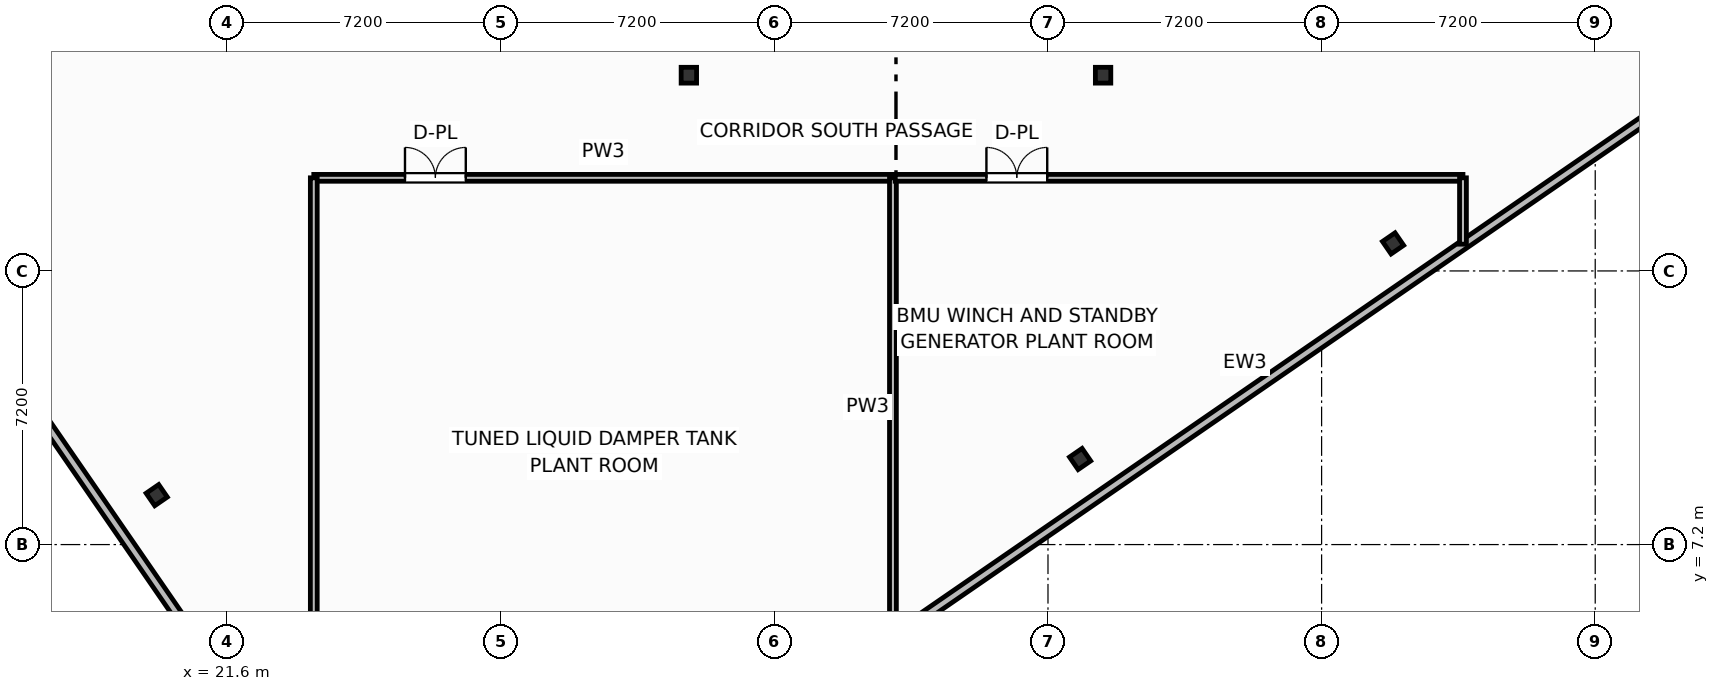
"""IFC4 building model, lengths in metres.
Left out: names, types, materials, properties, quantities, classifications, styles, units other than length and angle.
Written with IfcOpenShell. Run it as: python <this file> out.ifc"""

import sys

from ifc_helpers import new_model, si_unit, direction, frame, frame_2d, origin, origin_2d, place, context, subcontext, project, spatial, rectangle, i_section, extrude, element, fill, save


model = new_model("IFC4")
c1 = context("Model", 3, precision=1e-05, world=origin(), true_north=direction((0.0, 1.0)))
c2 = subcontext(c1, "Body", "Model", "MODEL_VIEW")
j1 = project(units=[si_unit("LENGTHUNIT", "METRE"), si_unit("PLANEANGLEUNIT", "RADIAN")], contexts=[c1])
p1 = place(None, origin())
s1 = spatial("IfcSite", under=j1, at=p1, CompositionType="ELEMENT")
p2 = place(p1, origin())
s2 = spatial("IfcBuilding", under=s1, at=p2, CompositionType="ELEMENT")
p3 = place(p2, frame((0.0, 0.0, 305.9)))
s3 = spatial("IfcBuildingStorey", under=s2, at=p3, CompositionType="ELEMENT", Elevation=305.9)
for number, where, z_axis, x_axis in (
    (1, (33.75, 19.55, 0.0), (0.0, 0.0, 1.0), (1.0, 0.0, 0.0)),
    (2, (44.65, 19.55, 0.0), (0.0, 0.0, 1.0), (1.0, 0.0, 0.0)),
):
    element("IfcColumn", number, at=place(p3, frame(where, z_axis=z_axis, x_axis=x_axis)), inside=s3, PredefinedType="COLUMN", context=c2, shape_type="SweptSolid", body=[
        extrude(i_section(OverallWidth=0.406, OverallDepth=0.416, WebThickness=0.03, FlangeThickness=0.048, FilletRadius=0.025, at=origin_2d()), origin(), (0.0, 0.0, 1.0), 4.8),
    ])
for number, where, z_axis, x_axis in (
    (3, (44.045, 9.452, 0.0), (0.0, 0.0, 1.0), (0.824, 0.567, 0.0)),
    (4, (52.281, 15.125, 0.0), (0.0, 0.0, 1.0), (0.824, 0.567, 0.0)),
    (5, (19.747, 8.5, 0.0), (0.0, 0.0, 1.0), (0.824, 0.567, 0.0)),
):
    element("IfcColumn", number, at=place(p3, frame(where, z_axis=z_axis, x_axis=x_axis)), inside=s3, PredefinedType="COLUMN", context=c2, shape_type="SweptSolid", body=[
        extrude(i_section(OverallWidth=0.401, OverallDepth=0.399, WebThickness=0.025, FlangeThickness=0.04, FilletRadius=0.022, at=origin_2d()), origin(), (0.0, 0.0, 1.0), 4.8),
    ])
p4 = place(p3, frame((33.952, 1.188, 0.0), z_axis=(0.0, 0.0, 1.0), x_axis=(0.823534980344, 0.567265490005, 0.0)))
e6 = element("IfcWall", 6, at=p4, inside=s3, PredefinedType="SOLIDWALL", context=c2, shape_type="SweptSolid", body=[
    extrude(rectangle(XDim=36.01, YDim=0.24, at=frame_2d((18.005, 0.0))), origin(), (0.0, 0.0, 1.0), 3.82),
])
p5 = place(p3, frame((9.991, 20.319, 0.0), z_axis=(0.0, 0.0, 1.0), x_axis=(0.567271592362, -0.823530776898, 0.0)))
e7 = element("IfcWall", 7, at=p5, inside=s3, PredefinedType="SOLIDWALL", context=c2, shape_type="SweptSolid", body=[
    extrude(rectangle(XDim=24.934, YDim=0.24, at=frame_2d((12.467, 0.0))), origin(), (0.0, 0.0, 1.0), 3.82),
])
p6 = place(p3, frame((23.88, 16.85, 0.0), z_axis=(0.0, 0.0, 1.0), x_axis=(1.0, 0.0, 0.0)))
e8 = element("IfcWall", 8, at=p6, inside=s3, PredefinedType="PARTITIONING", context=c2, shape_type="SweptSolid", body=[
    extrude(rectangle(XDim=15.24, YDim=0.18, at=frame_2d((7.62, 0.0))), origin(), (0.0, 0.0, 1.0), 4.54),
])
p7 = place(p6, frame((2.4, 0.0, 0.0)))
e9 = element("IfcOpeningElement", 9, at=p7, cuts=e8, PredefinedType="OPENING", context=c2, shape_type="SweptSolid", body=[
    extrude(rectangle(XDim=1.6, YDim=2.05, at=frame_2d((0.8, 1.025))), frame((0.0, 0.1, 0.0), z_axis=(0.0, -1.0, 0.0), x_axis=(1.0, 0.0, 0.0)), (0.0, 0.0, 1.0), 0.2),
])
p8 = place(p3, frame((39.12, 4.772, 0.0), z_axis=(0.0, 0.0, 1.0), x_axis=(0.0, 1.0, 0.0)))
e10 = element("IfcWall", 10, at=p8, inside=s3, PredefinedType="PARTITIONING", context=c2, shape_type="SweptSolid", body=[
    extrude(rectangle(XDim=12.078, YDim=0.18, at=frame_2d((6.039, 0.0))), origin(), (0.0, 0.0, 1.0), 4.54),
])
p9 = place(p3, frame((23.88, 0.25, 0.0), z_axis=(0.0, 0.0, 1.0), x_axis=(0.0, 1.0, 0.0)))
e11 = element("IfcWall", 11, at=p9, inside=s3, PredefinedType="PARTITIONING", context=c2, shape_type="SweptSolid", body=[
    extrude(rectangle(XDim=16.6, YDim=0.18, at=frame_2d((8.3, 0.0))), origin(), (0.0, 0.0, 1.0), 4.54),
])
p10 = place(p3, frame((39.18, 16.85, 0.0), z_axis=(0.0, 0.0, 1.0), x_axis=(1.0, 0.0, 0.0)))
e12 = element("IfcWall", 12, at=p10, inside=s3, PredefinedType="PARTITIONING", context=c2, shape_type="SweptSolid", body=[
    extrude(rectangle(XDim=14.94, YDim=0.18, at=frame_2d((7.47, 0.0))), origin(), (0.0, 0.0, 1.0), 4.54),
])
p11 = place(p10, frame((2.4, 0.0, 0.0)))
e13 = element("IfcOpeningElement", 13, at=p11, cuts=e12, PredefinedType="OPENING", context=c2, shape_type="SweptSolid", body=[
    extrude(rectangle(XDim=1.6, YDim=2.05, at=frame_2d((0.8, 1.025))), frame((0.0, 0.1, 0.0), z_axis=(0.0, -1.0, 0.0), x_axis=(1.0, 0.0, 0.0)), (0.0, 0.0, 1.0), 0.2),
])
p12 = place(p3, frame((54.12, 15.104, 0.0), z_axis=(0.0, 0.0, 1.0), x_axis=(0.0, 1.0, 0.0)))
e14 = element("IfcWall", 14, at=p12, inside=s3, PredefinedType="PARTITIONING", context=c2, shape_type="SweptSolid", body=[
    extrude(rectangle(XDim=1.746, YDim=0.18, at=frame_2d((0.873, 0.0))), origin(), (0.0, 0.0, 1.0), 4.54),
])
p13 = place(p7, origin())
e15 = element("IfcDoor", 15, at=p13, inside=s3, OperationType="DOUBLE_DOOR_SINGLE_SWING", PredefinedType="DOOR", context=c2, shape_type="SweptSolid", body=[
    extrude(rectangle(XDim=1.6, YDim=2.05, at=frame_2d((0.8, 1.025))), frame((0.0, 0.025, 0.0), z_axis=(0.0, -1.0, 0.0), x_axis=(1.0, 0.0, 0.0)), (0.0, 0.0, 1.0), 0.05),
])
fill(e9, e15)
p14 = place(p11, origin())
e16 = element("IfcDoor", 16, at=p14, inside=s3, OperationType="DOUBLE_DOOR_SINGLE_SWING", PredefinedType="DOOR", context=c2, shape_type="SweptSolid", body=[
    extrude(rectangle(XDim=1.6, YDim=2.05, at=frame_2d((0.8, 1.025))), frame((0.0, 0.025, 0.0), z_axis=(0.0, -1.0, 0.0), x_axis=(1.0, 0.0, 0.0)), (0.0, 0.0, 1.0), 0.05),
])
fill(e13, e16)
save(model, sys.argv[1])
